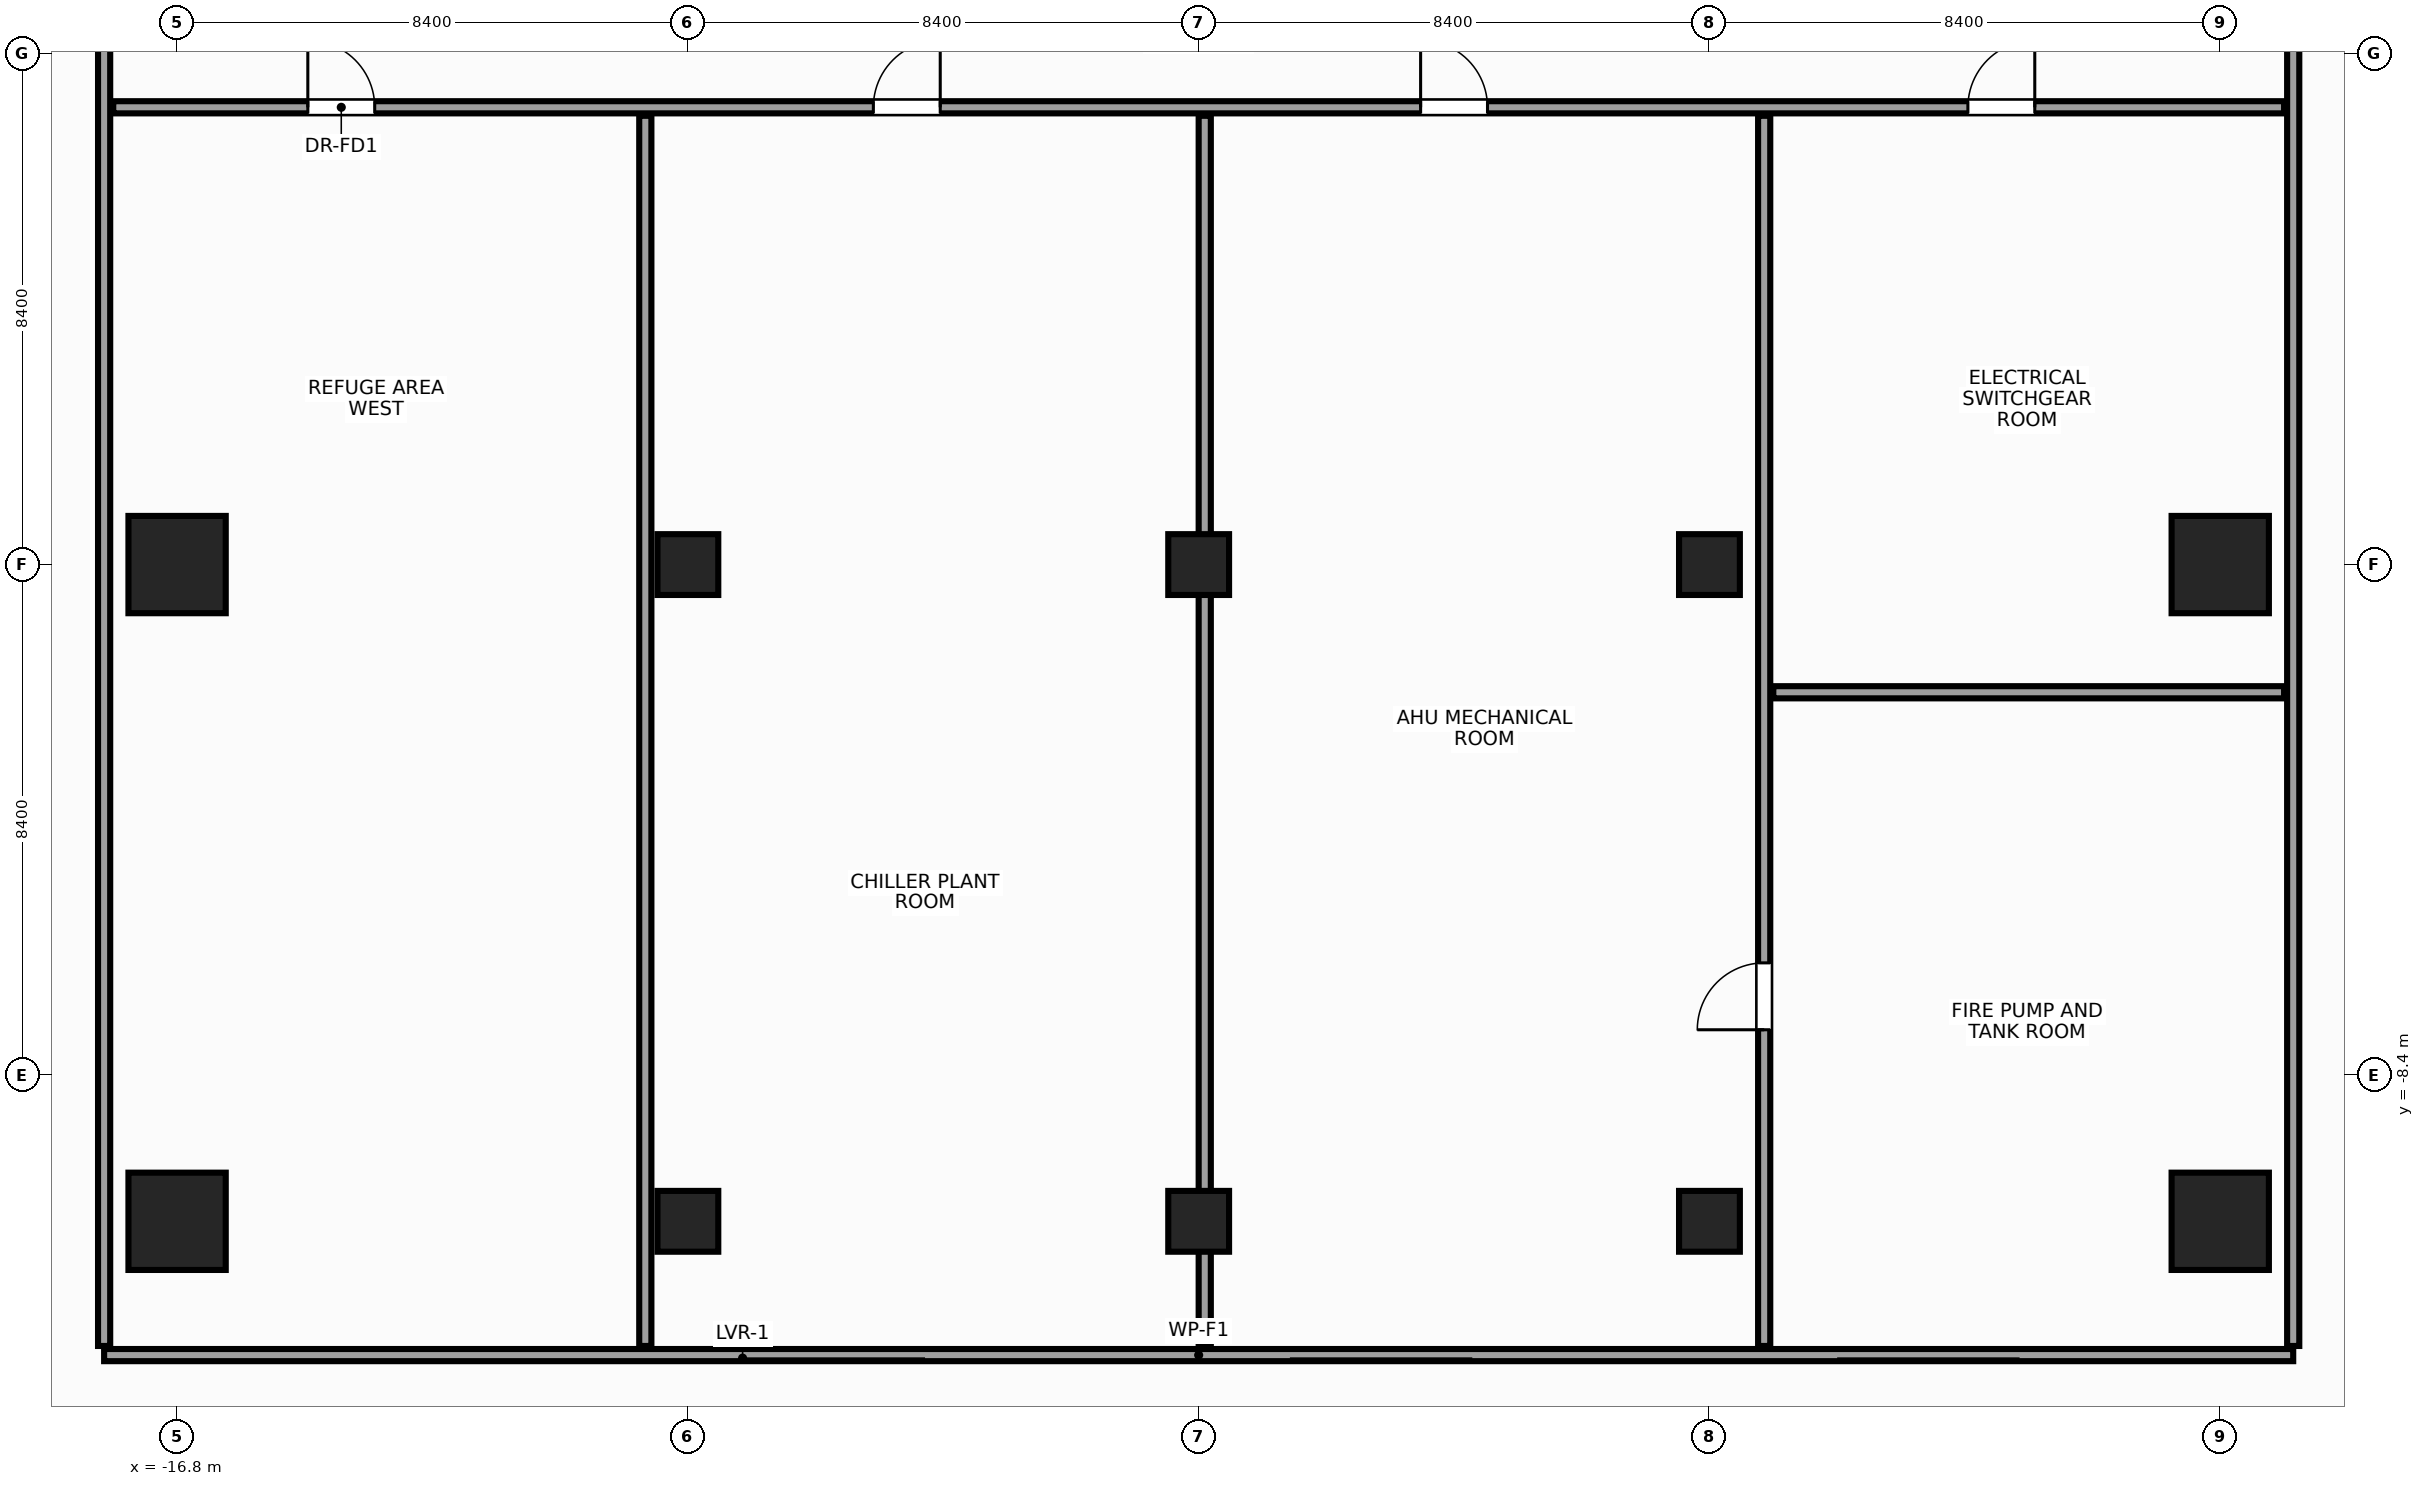
"""IFC4 building model, lengths in metres.
Left out: names, types, materials, properties, quantities, classifications, styles, units other than length and angle.
Written with IfcOpenShell. Run it as: python <this file> out.ifc"""

import sys

from ifc_helpers import new_model, si_unit, direction, frame, frame_2d, origin, origin_2d, place, context, subcontext, project, spatial, rectangle, hollow_rectangle, extrude, source, transform, mapped, element, fill, save


model = new_model("IFC4")
c1 = context("Model", 3, precision=1e-05, world=origin(), true_north=direction((0.0, 1.0)))
c2 = subcontext(c1, "Body", "Model", "MODEL_VIEW")
j1 = project(units=[si_unit("LENGTHUNIT", "METRE"), si_unit("PLANEANGLEUNIT", "RADIAN")], contexts=[c1])
p1 = place(None, origin())
s1 = spatial("IfcSite", under=j1, at=p1, CompositionType="ELEMENT")
p2 = place(p1, origin())
s2 = spatial("IfcBuilding", under=s1, at=p2, CompositionType="ELEMENT")
p3 = place(p2, frame((0.0, 0.0, 124.4)))
s3 = spatial("IfcBuildingStorey", under=s2, at=p3, CompositionType="ELEMENT", Elevation=124.4)
m1 = source(origin(), c2, "Body", "SweptSolid", [
    extrude(rectangle(XDim=1.6, YDim=1.6, at=origin_2d()), origin(), (0.0, 0.0, 1.0), 7.2),
])
for number, where, z_axis, x_axis in (
    (1, (-16.8, -10.8, 0.0), (0.0, 0.0, 1.0), (1.0, 0.0, 0.0)),
    (2, (-16.8, 0.0, 0.0), (0.0, 0.0, 1.0), (1.0, 0.0, 0.0)),
    (3, (16.8, -10.8, 0.0), (0.0, 0.0, 1.0), (1.0, 0.0, 0.0)),
    (4, (16.8, 0.0, 0.0), (0.0, 0.0, 1.0), (1.0, 0.0, 0.0)),
):
    element("IfcColumn", number, at=place(p3, frame(where, z_axis=z_axis, x_axis=x_axis)), inside=s3, PredefinedType="COLUMN", context=c2, shape_type="MappedRepresentation", body=[
        mapped(m1, transform((0.0, 0.0, 0.0), x_axis=(1.0, 0.0, 0.0), y_axis=(0.0, 1.0, 0.0), z_axis=(0.0, 0.0, 1.0), scale=1.0)),
    ])
m2 = source(origin(), c2, "Body", "SweptSolid", [
    extrude(hollow_rectangle(XDim=1.0, YDim=1.0, WallThickness=0.045, at=origin_2d()), origin(), (0.0, 0.0, 1.0), 7.2),
])
for number, where, z_axis, x_axis in (
    (5, (-8.4, 0.0, 0.0), (0.0, 0.0, 1.0), (1.0, 0.0, 0.0)),
    (6, (-8.4, -10.8, 0.0), (0.0, 0.0, 1.0), (1.0, 0.0, 0.0)),
    (7, (8.4, 0.0, 0.0), (0.0, 0.0, 1.0), (1.0, 0.0, 0.0)),
    (8, (8.4, -10.8, 0.0), (0.0, 0.0, 1.0), (1.0, 0.0, 0.0)),
):
    element("IfcColumn", number, at=place(p3, frame(where, z_axis=z_axis, x_axis=x_axis)), inside=s3, PredefinedType="COLUMN", context=c2, shape_type="MappedRepresentation", body=[
        mapped(m2, transform((0.0, 0.0, 0.0), x_axis=(1.0, 0.0, 0.0), y_axis=(0.0, 1.0, 0.0), z_axis=(0.0, 0.0, 1.0), scale=1.0)),
    ])
m3 = source(origin(), c2, "Body", "SweptSolid", [
    extrude(rectangle(XDim=1.0, YDim=1.0, at=origin_2d()), origin(), (0.0, 0.0, 1.0), 7.2),
])
for number, where, z_axis, x_axis in (
    (9, (0.0, -10.8, 0.0), (0.0, 0.0, 1.0), (1.0, 0.0, 0.0)),
    (10, (0.0, 0.0, 0.0), (0.0, 0.0, 1.0), (1.0, 0.0, 0.0)),
):
    element("IfcColumn", number, at=place(p3, frame(where, z_axis=z_axis, x_axis=x_axis)), inside=s3, PredefinedType="COLUMN", context=c2, shape_type="MappedRepresentation", body=[
        mapped(m3, transform((0.0, 0.0, 0.0), x_axis=(1.0, 0.0, 0.0), y_axis=(0.0, 1.0, 0.0), z_axis=(0.0, 0.0, 1.0), scale=1.0)),
    ])
m4 = source(origin(), c2, "Body", "SweptSolid", [
    extrude(rectangle(XDim=36.0, YDim=0.2, at=frame_2d((18.0, 0.0))), origin(), (0.0, 0.0, 1.0), 6.485),
])
p4 = place(p3, frame((-18.0, -13.0, 0.0), z_axis=(0.0, 0.0, 1.0), x_axis=(1.0, 0.0, 0.0)))
e11 = element("IfcWall", 11, at=p4, inside=s3, PredefinedType="PARTITIONING", context=c2, shape_type="MappedRepresentation", body=[
    mapped(m4, transform((0.0, 0.0, 0.0), x_axis=(1.0, 0.0, 0.0), y_axis=(0.0, 1.0, 0.0), z_axis=(0.0, 0.0, 1.0), scale=1.0)),
])
m5 = source(origin(), c2, "Body", "SweptSolid", [
    extrude(rectangle(XDim=22.85, YDim=0.2, at=frame_2d((11.425, 0.0))), origin(), (0.0, 0.0, 1.0), 6.435),
])
for number, where, z_axis, x_axis in (
    (12, (-18.0, -12.85, 0.0), (0.0, 0.0, 1.0), (0.0, 1.0, 0.0)),
    (13, (18.0, -12.85, 0.0), (0.0, 0.0, 1.0), (0.0, 1.0, 0.0)),
):
    element("IfcWall", number, at=place(p3, frame(where, z_axis=z_axis, x_axis=x_axis)), inside=s3, PredefinedType="PARTITIONING", context=c2, shape_type="MappedRepresentation", body=[
        mapped(m5, transform((0.0, 0.0, 0.0), x_axis=(1.0, 0.0, 0.0), y_axis=(0.0, 1.0, 0.0), z_axis=(0.0, 0.0, 1.0), scale=1.0)),
    ])
m6 = source(origin(), c2, "Body", "SweptSolid", [
    extrude(rectangle(XDim=35.7, YDim=0.2, at=frame_2d((17.85, 0.0))), origin(), (0.0, 0.0, 1.0), 6.285),
])
p5 = place(p3, frame((-17.85, 7.52, 0.0), z_axis=(0.0, 0.0, 1.0), x_axis=(1.0, 0.0, 0.0)))
e14 = element("IfcWall", 14, at=p5, inside=s3, PredefinedType="PARTITIONING", context=c2, shape_type="MappedRepresentation", body=[
    mapped(m6, transform((0.0, 0.0, 0.0), x_axis=(1.0, 0.0, 0.0), y_axis=(0.0, 1.0, 0.0), z_axis=(0.0, 0.0, 1.0), scale=1.0)),
])
p6 = place(p5, frame((3.2, 0.0, 0.0)))
e15 = element("IfcOpeningElement", 15, at=p6, cuts=e14, PredefinedType="OPENING", context=c2, shape_type="SweptSolid", body=[
    extrude(rectangle(XDim=1.1, YDim=2.15, at=frame_2d((0.55, 1.075))), frame((0.0, 0.112, 0.0), z_axis=(0.0, -1.0, 0.0), x_axis=(1.0, 0.0, 0.0)), (0.0, 0.0, 1.0), 0.224),
])
p7 = place(p5, frame((12.5, 0.0, 0.0)))
e16 = element("IfcOpeningElement", 16, at=p7, cuts=e14, PredefinedType="OPENING", context=c2, shape_type="SweptSolid", body=[
    extrude(rectangle(XDim=1.1, YDim=2.15, at=frame_2d((0.55, 1.075))), frame((0.0, 0.112, 0.0), z_axis=(0.0, -1.0, 0.0), x_axis=(1.0, 0.0, 0.0)), (0.0, 0.0, 1.0), 0.224),
])
p8 = place(p5, frame((21.5, 0.0, 0.0)))
e17 = element("IfcOpeningElement", 17, at=p8, cuts=e14, PredefinedType="OPENING", context=c2, shape_type="SweptSolid", body=[
    extrude(rectangle(XDim=1.1, YDim=2.15, at=frame_2d((0.55, 1.075))), frame((0.0, 0.112, 0.0), z_axis=(0.0, -1.0, 0.0), x_axis=(1.0, 0.0, 0.0)), (0.0, 0.0, 1.0), 0.224),
])
p9 = place(p5, frame((30.5, 0.0, 0.0)))
e18 = element("IfcOpeningElement", 18, at=p9, cuts=e14, PredefinedType="OPENING", context=c2, shape_type="SweptSolid", body=[
    extrude(rectangle(XDim=1.1, YDim=2.15, at=frame_2d((0.55, 1.075))), frame((0.0, 0.112, 0.0), z_axis=(0.0, -1.0, 0.0), x_axis=(1.0, 0.0, 0.0)), (0.0, 0.0, 1.0), 0.224),
])
m7 = source(origin(), c2, "Body", "SweptSolid", [
    extrude(rectangle(XDim=20.23, YDim=0.2, at=frame_2d((10.115, 0.0))), origin(), (0.0, 0.0, 1.0), 6.185),
])
for number, where, z_axis, x_axis in (
    (19, (-9.1, -12.85, 0.0), (0.0, 0.0, 1.0), (0.0, 1.0, 0.0)),
    (20, (0.1, -12.85, 0.0), (0.0, 0.0, 1.0), (0.0, 1.0, 0.0)),
):
    element("IfcWall", number, at=place(p3, frame(where, z_axis=z_axis, x_axis=x_axis)), inside=s3, PredefinedType="PARTITIONING", context=c2, shape_type="MappedRepresentation", body=[
        mapped(m7, transform((0.0, 0.0, 0.0), x_axis=(1.0, 0.0, 0.0), y_axis=(0.0, 1.0, 0.0), z_axis=(0.0, 0.0, 1.0), scale=1.0)),
    ])
p10 = place(p3, frame((9.3, -12.85, 0.0), z_axis=(0.0, 0.0, 1.0), x_axis=(0.0, 1.0, 0.0)))
e21 = element("IfcWall", 21, at=p10, inside=s3, PredefinedType="PARTITIONING", context=c2, shape_type="MappedRepresentation", body=[
    mapped(m7, transform((0.0, 0.0, 0.0), x_axis=(1.0, 0.0, 0.0), y_axis=(0.0, 1.0, 0.0), z_axis=(0.0, 0.0, 1.0), scale=1.0)),
])
p11 = place(p10, frame((5.2, 0.0, 0.0)))
e22 = element("IfcOpeningElement", 22, at=p11, cuts=e21, PredefinedType="OPENING", context=c2, shape_type="SweptSolid", body=[
    extrude(rectangle(XDim=1.1, YDim=2.15, at=frame_2d((0.55, 1.075))), frame((0.0, 0.112, 0.0), z_axis=(0.0, -1.0, 0.0), x_axis=(1.0, 0.0, 0.0)), (0.0, 0.0, 1.0), 0.224),
])
m8 = source(origin(), c2, "Body", "SweptSolid", [
    extrude(rectangle(XDim=8.4, YDim=0.2, at=frame_2d((4.2, 0.0))), origin(), (0.0, 0.0, 1.0), 6.285),
])
p12 = place(p3, frame((9.45, -2.1, 0.0), z_axis=(0.0, 0.0, 1.0), x_axis=(1.0, 0.0, 0.0)))
e23 = element("IfcWall", 23, at=p12, inside=s3, PredefinedType="PARTITIONING", context=c2, shape_type="MappedRepresentation", body=[
    mapped(m8, transform((0.0, 0.0, 0.0), x_axis=(1.0, 0.0, 0.0), y_axis=(0.0, 1.0, 0.0), z_axis=(0.0, 0.0, 1.0), scale=1.0)),
])
m9 = source(origin(), c2, "Body", "SweptSolid", [
    extrude(rectangle(XDim=1.1, YDim=2.15, at=frame_2d((0.55, 1.075))), frame((0.0, 0.025, 0.0), z_axis=(0.0, -1.0, 0.0), x_axis=(1.0, 0.0, 0.0)), (0.0, 0.0, 1.0), 0.05),
])
p13 = place(p6, origin())
e24 = element("IfcDoor", 24, at=p13, inside=s3, OperationType="SINGLE_SWING_LEFT", PredefinedType="DOOR", context=c2, shape_type="MappedRepresentation", body=[
    mapped(m9, transform((0.0, 0.0, 0.0), x_axis=(1.0, 0.0, 0.0), y_axis=(0.0, 1.0, 0.0), z_axis=(0.0, 0.0, 1.0), scale=1.0)),
])
fill(e15, e24)
p14 = place(p7, origin())
e25 = element("IfcDoor", 25, at=p14, inside=s3, OperationType="SINGLE_SWING_RIGHT", PredefinedType="DOOR", context=c2, shape_type="MappedRepresentation", body=[
    mapped(m9, transform((0.0, 0.0, 0.0), x_axis=(1.0, 0.0, 0.0), y_axis=(0.0, 1.0, 0.0), z_axis=(0.0, 0.0, 1.0), scale=1.0)),
])
fill(e16, e25)
p15 = place(p8, origin())
e26 = element("IfcDoor", 26, at=p15, inside=s3, OperationType="SINGLE_SWING_LEFT", PredefinedType="DOOR", context=c2, shape_type="MappedRepresentation", body=[
    mapped(m9, transform((0.0, 0.0, 0.0), x_axis=(1.0, 0.0, 0.0), y_axis=(0.0, 1.0, 0.0), z_axis=(0.0, 0.0, 1.0), scale=1.0)),
])
fill(e17, e26)
p16 = place(p9, origin())
e27 = element("IfcDoor", 27, at=p16, inside=s3, OperationType="SINGLE_SWING_RIGHT", PredefinedType="DOOR", context=c2, shape_type="MappedRepresentation", body=[
    mapped(m9, transform((0.0, 0.0, 0.0), x_axis=(1.0, 0.0, 0.0), y_axis=(0.0, 1.0, 0.0), z_axis=(0.0, 0.0, 1.0), scale=1.0)),
])
fill(e18, e27)
p17 = place(p11, origin())
e28 = element("IfcDoor", 28, at=p17, inside=s3, OperationType="SINGLE_SWING_LEFT", PredefinedType="DOOR", context=c2, shape_type="MappedRepresentation", body=[
    mapped(m9, transform((0.0, 0.0, 0.0), x_axis=(1.0, 0.0, 0.0), y_axis=(0.0, 1.0, 0.0), z_axis=(0.0, 0.0, 1.0), scale=1.0)),
])
fill(e22, e28)
save(model, sys.argv[1])
